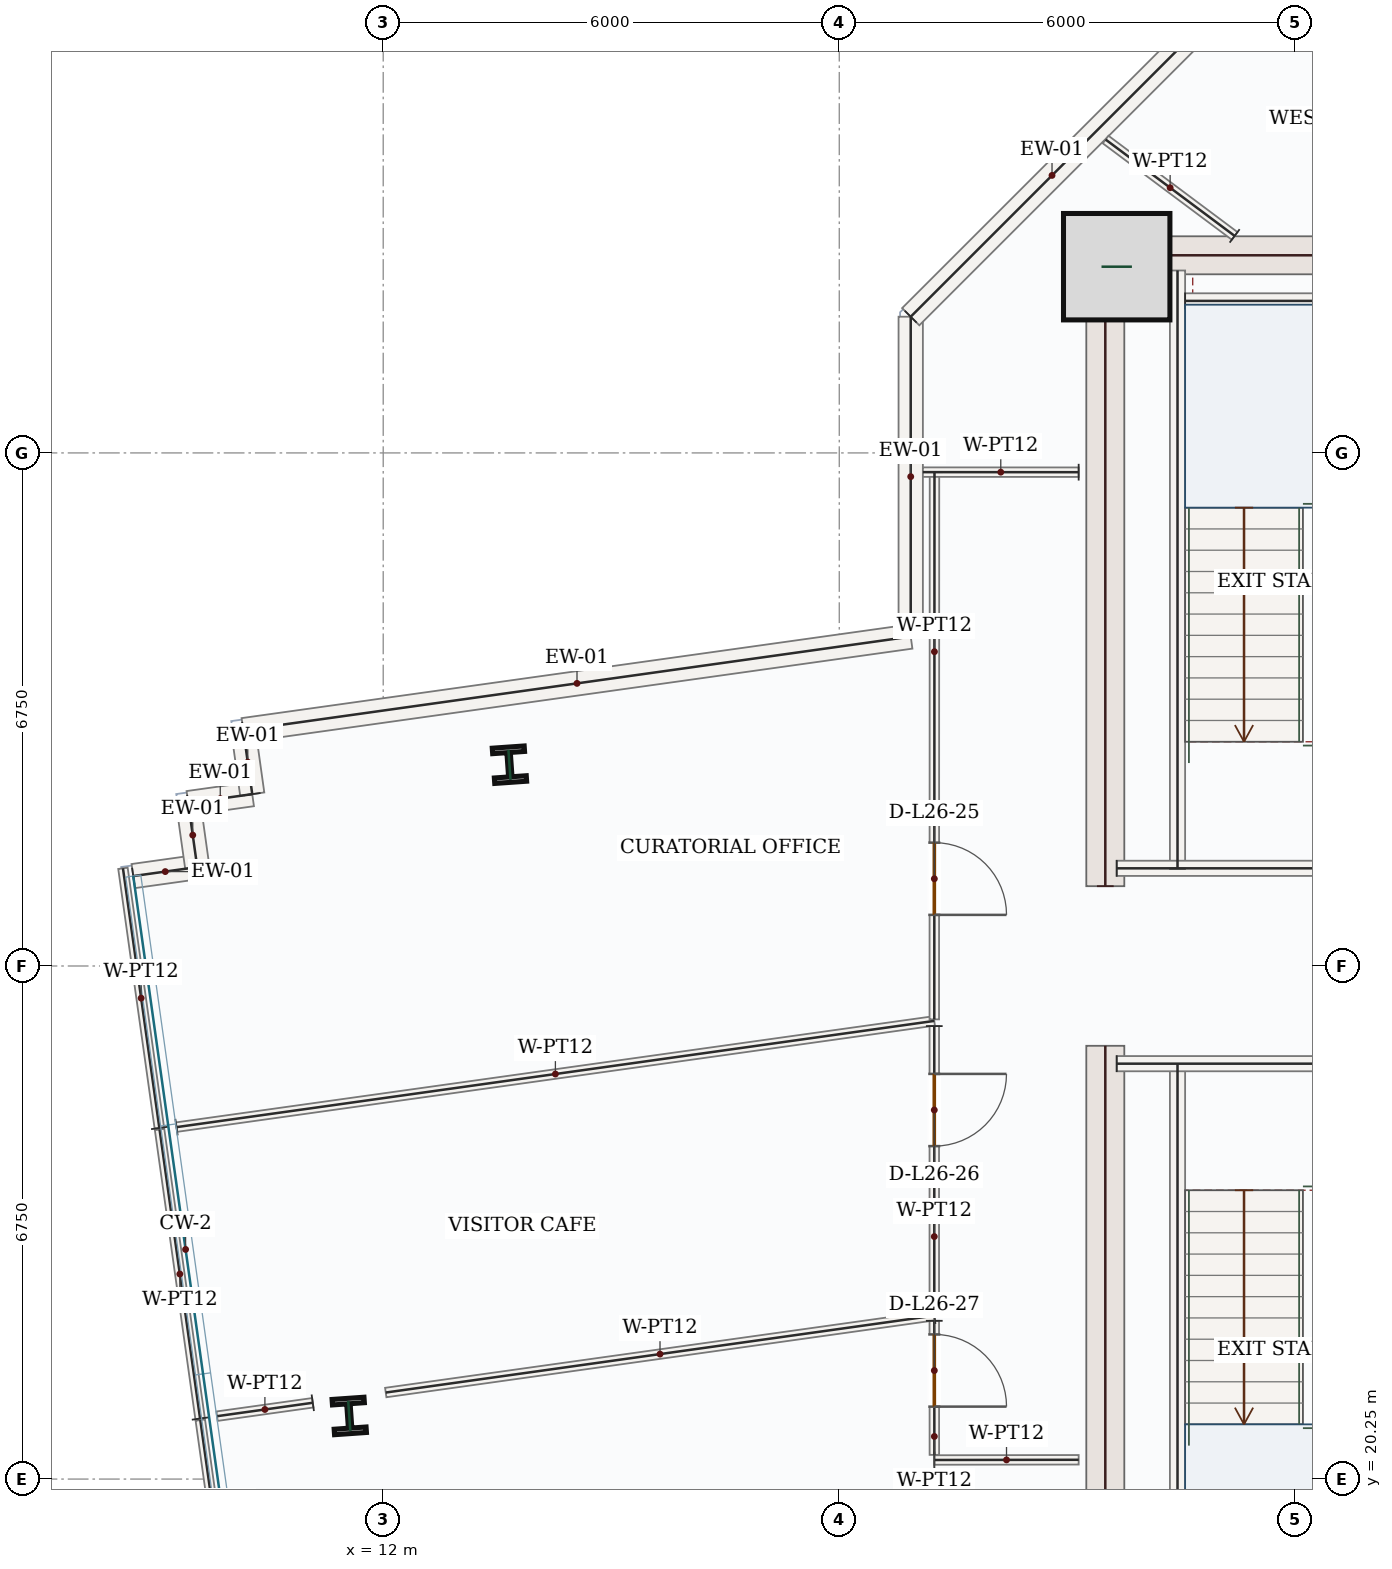
"""IFC4 building model, lengths in metres.
Left out: names, types, materials, properties, quantities, classifications, styles, units other than length and angle.
Written with IfcOpenShell. Run it as: python <this file> out.ifc"""

import sys

from ifc_helpers import new_model, si_unit, direction, frame, frame_2d, origin, origin_2d, place, context, subcontext, project, spatial, rectangle, i_section, extrude, source, transform, mapped, element, fill, save


model = new_model("IFC4")
c1 = context("Model", 3, precision=1e-05, world=origin(), true_north=direction((0.0, 1.0)))
c2 = subcontext(c1, "Body", "Model", "MODEL_VIEW")
j1 = project(units=[si_unit("LENGTHUNIT", "METRE"), si_unit("PLANEANGLEUNIT", "RADIAN")], contexts=[c1])
p1 = place(None, origin())
s1 = spatial("IfcSite", under=j1, at=p1, CompositionType="ELEMENT")
p2 = place(p1, origin())
s2 = spatial("IfcBuilding", under=s1, at=p2, CompositionType="ELEMENT")
p3 = place(p2, frame((0.0, 0.0, 117.3)))
s3 = spatial("IfcBuildingStorey", under=s2, at=p3, CompositionType="ELEMENT", Elevation=117.3)
m1 = source(origin(), c2, "Body", "SweptSolid", [
    extrude(rectangle(XDim=8.55, YDim=0.5, at=frame_2d((4.275, 0.0))), origin(), (0.0, 0.0, 1.0), 3.95),
])
for number, where, z_axis, x_axis in (
    (1, (21.5, 17.4, 0.0), (0.0, 0.0, 1.0), (0.0, 1.0, 0.0)),
    (2, (21.5, 28.05, 0.0), (0.0, 0.0, 1.0), (0.0, 1.0, 0.0)),
):
    element("IfcWall", number, at=place(p3, frame(where, z_axis=z_axis, x_axis=x_axis)), inside=s3, PredefinedType="SHEAR", context=c2, shape_type="MappedRepresentation", body=[
        mapped(m1, transform((0.0, 0.0, 0.0), x_axis=(1.0, 0.0, 0.0), y_axis=(0.0, 1.0, 0.0), z_axis=(0.0, 0.0, 1.0), scale=1.0)),
    ])
m2 = source(origin(), c2, "Body", "SweptSolid", [
    extrude(rectangle(XDim=7.0, YDim=0.5, at=frame_2d((3.5, 0.0))), origin(), (0.0, 0.0, 1.0), 3.95),
])
p4 = place(p3, frame((21.75, 36.35, 0.0), z_axis=(0.0, 0.0, 1.0), x_axis=(1.0, 0.0, 0.0)))
e3 = element("IfcWall", 3, at=p4, inside=s3, PredefinedType="SHEAR", context=c2, shape_type="MappedRepresentation", body=[
    mapped(m2, transform((0.0, 0.0, 0.0), x_axis=(1.0, 0.0, 0.0), y_axis=(0.0, 1.0, 0.0), z_axis=(0.0, 0.0, 1.0), scale=1.0)),
])
m3 = source(origin(), c2, "Body", "SweptSolid", [
    extrude(rectangle(XDim=1.4, YDim=1.4, at=origin_2d()), origin(), (0.0, 0.0, 1.0), 4.2),
])
p5 = place(p3, frame((21.65, 36.2, 0.0), z_axis=(0.0, 0.0, 1.0), x_axis=(1.0, 0.0, 0.0)))
e4 = element("IfcColumn", 4, at=p5, inside=s3, PredefinedType="COLUMN", context=c2, shape_type="MappedRepresentation", body=[
    mapped(m3, transform((0.0, 0.0, 0.0), x_axis=(1.0, 0.0, 0.0), y_axis=(0.0, 1.0, 0.0), z_axis=(0.0, 0.0, 1.0), scale=1.0)),
])
m4 = source(origin(), c2, "Body", "SweptSolid", [
    extrude(i_section(OverallWidth=0.421, OverallDepth=0.465, WebThickness=0.045, FlangeThickness=0.073, FilletRadius=0.018, at=origin_2d()), origin(), (0.0, 0.0, 1.0), 4.2),
])
for number, where, z_axis, x_axis in (
    (5, (13.661, 29.648, 0.0), (0.0, 0.0, 1.0), (0.998, 0.07, 0.0)),
    (6, (11.553, 21.08, 0.0), (0.0, 0.0, 1.0), (0.998, 0.07, 0.0)),
):
    element("IfcColumn", number, at=place(p3, frame(where, z_axis=z_axis, x_axis=x_axis)), inside=s3, PredefinedType="COLUMN", context=c2, shape_type="MappedRepresentation", body=[
        mapped(m4, transform((0.0, 0.0, 0.0), x_axis=(1.0, 0.0, 0.0), y_axis=(0.0, 1.0, 0.0), z_axis=(0.0, 0.0, 1.0), scale=1.0)),
    ])
m5 = source(origin(), c2, "Body", "SweptSolid", [
    extrude(rectangle(XDim=0.85, YDim=0.32, at=frame_2d((0.425, 0.0))), origin(), (0.0, 0.0, 1.0), 3.95),
])
for number, where, z_axis, x_axis in (
    (7, (8.711, 28.183, 0.0), (0.0, 0.0, 1.0), (0.99, 0.139, 0.0)),
    (8, (9.553, 28.301, 0.0), (0.0, 0.0, 1.0), (-0.139, 0.99, 0.0)),
    (9, (9.435, 29.143, 0.0), (0.0, 0.0, 1.0), (0.99, 0.139, 0.0)),
    (10, (10.277, 29.261, 0.0), (0.0, 0.0, 1.0), (-0.139, 0.99, 0.0)),
):
    element("IfcWall", number, at=place(p3, frame(where, z_axis=z_axis, x_axis=x_axis)), inside=s3, PredefinedType="SOLIDWALL", context=c2, shape_type="MappedRepresentation", body=[
        mapped(m5, transform((0.0, 0.0, 0.0), x_axis=(1.0, 0.0, 0.0), y_axis=(0.0, 1.0, 0.0), z_axis=(0.0, 0.0, 1.0), scale=1.0)),
    ])
m6 = source(origin(), c2, "Body", "SweptSolid", [
    extrude(rectangle(XDim=8.867, YDim=0.32, at=frame_2d((4.433, 0.0))), origin(), (0.0, 0.0, 1.0), 3.95),
])
p6 = place(p3, frame((10.159, 30.103, 0.0), z_axis=(0.0, 0.0, 1.0), x_axis=(0.990316171862, 0.138830399225, 0.0)))
e11 = element("IfcWall", 11, at=p6, inside=s3, PredefinedType="SOLIDWALL", context=c2, shape_type="MappedRepresentation", body=[
    mapped(m6, transform((0.0, 0.0, 0.0), x_axis=(1.0, 0.0, 0.0), y_axis=(0.0, 1.0, 0.0), z_axis=(0.0, 0.0, 1.0), scale=1.0)),
])
m7 = source(origin(), c2, "Body", "SweptSolid", [
    extrude(rectangle(XDim=4.208, YDim=0.32, at=frame_2d((2.104, 0.0))), origin(), (0.0, 0.0, 1.0), 3.95),
])
p7 = place(p3, frame((18.94, 31.333, 0.0), z_axis=(0.0, 0.0, 1.0), x_axis=(0.0, 1.0, 0.0)))
e12 = element("IfcWall", 12, at=p7, inside=s3, PredefinedType="SOLIDWALL", context=c2, shape_type="MappedRepresentation", body=[
    mapped(m7, transform((0.0, 0.0, 0.0), x_axis=(1.0, 0.0, 0.0), y_axis=(0.0, 1.0, 0.0), z_axis=(0.0, 0.0, 1.0), scale=1.0)),
])
m8 = source(origin(), c2, "Body", "SweptSolid", [
    extrude(rectangle(XDim=5.258, YDim=0.32, at=frame_2d((2.629, 0.0))), origin(), (0.0, 0.0, 1.0), 3.95),
])
p8 = place(p3, frame((18.94, 35.542, 0.0), z_axis=(0.0, 0.0, 1.0), x_axis=(0.707106781187, 0.707106781187, 0.0)))
e13 = element("IfcWall", 13, at=p8, inside=s3, PredefinedType="SOLIDWALL", context=c2, shape_type="MappedRepresentation", body=[
    mapped(m8, transform((0.0, 0.0, 0.0), x_axis=(1.0, 0.0, 0.0), y_axis=(0.0, 1.0, 0.0), z_axis=(0.0, 0.0, 1.0), scale=1.0)),
])
m9 = source(origin(), c2, "Body", "SweptSolid", [
    extrude(rectangle(XDim=7.87, YDim=0.2, at=frame_2d((3.935, 0.0))), origin(), (0.0, 0.0, 1.0), 3.95),
])
for number, where, z_axis, x_axis in (
    (14, (22.45, 17.85, 0.0), (0.0, 0.0, 1.0), (0.0, 1.0, 0.0)),
    (15, (22.45, 28.28, 0.0), (0.0, 0.0, 1.0), (0.0, 1.0, 0.0)),
):
    element("IfcWall", number, at=place(p3, frame(where, z_axis=z_axis, x_axis=x_axis)), inside=s3, PredefinedType="SOLIDWALL", context=c2, shape_type="MappedRepresentation", body=[
        mapped(m9, transform((0.0, 0.0, 0.0), x_axis=(1.0, 0.0, 0.0), y_axis=(0.0, 1.0, 0.0), z_axis=(0.0, 0.0, 1.0), scale=1.0)),
    ])
m10 = source(origin(), c2, "Body", "SweptSolid", [
    extrude(rectangle(XDim=4.25, YDim=0.2, at=frame_2d((2.125, 0.0))), origin(), (0.0, 0.0, 1.0), 3.95),
])
for number, where, z_axis, x_axis in (
    (16, (21.65, 25.715, 0.0), (0.0, 0.0, 1.0), (1.0, 0.0, 0.0)),
    (17, (21.65, 28.285, 0.0), (0.0, 0.0, 1.0), (1.0, 0.0, 0.0)),
):
    element("IfcWall", number, at=place(p3, frame(where, z_axis=z_axis, x_axis=x_axis)), inside=s3, PredefinedType="SOLIDWALL", context=c2, shape_type="MappedRepresentation", body=[
        mapped(m10, transform((0.0, 0.0, 0.0), x_axis=(1.0, 0.0, 0.0), y_axis=(0.0, 1.0, 0.0), z_axis=(0.0, 0.0, 1.0), scale=1.0)),
    ])
m11 = source(origin(), c2, "Body", "SweptSolid", [
    extrude(rectangle(XDim=3.25, YDim=0.2, at=frame_2d((1.625, 0.0))), origin(), (0.0, 0.0, 1.0), 3.95),
])
p9 = place(p3, frame((22.55, 35.75, 0.0), z_axis=(0.0, 0.0, 1.0), x_axis=(1.0, 0.0, 0.0)))
e18 = element("IfcWall", 18, at=p9, inside=s3, PredefinedType="SOLIDWALL", context=c2, shape_type="MappedRepresentation", body=[
    mapped(m11, transform((0.0, 0.0, 0.0), x_axis=(1.0, 0.0, 0.0), y_axis=(0.0, 1.0, 0.0), z_axis=(0.0, 0.0, 1.0), scale=1.0)),
])
m12 = source(origin(), c2, "Body", "SweptSolid", [
    extrude(rectangle(XDim=1.272, YDim=0.125, at=frame_2d((0.636, 0.0))), origin(), (0.0, 0.0, 1.0), 3.95),
])
p10 = place(p3, frame((11.073, 21.254, 0.0), z_axis=(0.0, 0.0, 1.0), x_axis=(-0.990325928558, -0.138760784176, 0.0)))
e19 = element("IfcWall", 19, at=p10, inside=s3, PredefinedType="PARTITIONING", context=c2, shape_type="MappedRepresentation", body=[
    mapped(m12, transform((0.0, 0.0, 0.0), x_axis=(1.0, 0.0, 0.0), y_axis=(0.0, 1.0, 0.0), z_axis=(0.0, 0.0, 1.0), scale=1.0)),
])
m13 = source(origin(), c2, "Body", "SweptSolid", [
    extrude(rectangle(XDim=3.84, YDim=0.125, at=frame_2d((1.92, 0.0))), origin(), (0.0, 0.0, 1.0), 3.95),
])
p11 = place(p3, frame((9.591, 21.046, 0.0), z_axis=(0.0, 0.0, 1.0), x_axis=(-0.138795007241, 0.990321132747, 0.0)))
e20 = element("IfcWall", 20, at=p11, inside=s3, PredefinedType="PARTITIONING", context=c2, shape_type="MappedRepresentation", body=[
    mapped(m13, transform((0.0, 0.0, 0.0), x_axis=(1.0, 0.0, 0.0), y_axis=(0.0, 1.0, 0.0), z_axis=(0.0, 0.0, 1.0), scale=1.0)),
])
m14 = source(origin(), c2, "Body", "SweptSolid", [
    extrude(rectangle(XDim=10.067, YDim=0.125, at=frame_2d((5.033, 0.0))), origin(), (0.0, 0.0, 1.0), 3.95),
])
p12 = place(p3, frame((9.281, 24.88, 0.0), z_axis=(0.0, 0.0, 1.0), x_axis=(0.990318089486, 0.138816719584, 0.0)))
e21 = element("IfcWall", 21, at=p12, inside=s3, PredefinedType="PARTITIONING", context=c2, shape_type="MappedRepresentation", body=[
    mapped(m14, transform((0.0, 0.0, 0.0), x_axis=(1.0, 0.0, 0.0), y_axis=(0.0, 1.0, 0.0), z_axis=(0.0, 0.0, 1.0), scale=1.0)),
])
p13 = place(p3, frame((19.25, 26.209, 0.0), z_axis=(0.0, 0.0, 1.0), x_axis=(0.0, -1.0, 0.0)))
e22 = element("IfcWall", 22, at=p13, inside=s3, PredefinedType="PARTITIONING", context=c2, shape_type="SweptSolid", body=[
    extrude(rectangle(XDim=3.809, YDim=0.125, at=frame_2d((1.905, 0.0))), origin(), (0.0, 0.0, 1.0), 3.95),
])
p14 = place(p13, frame((0.629, 0.0, 0.0)))
e23 = element("IfcOpeningElement", 23, at=p14, cuts=e22, PredefinedType="OPENING", context=c2, shape_type="SweptSolid", body=[
    extrude(rectangle(XDim=0.95, YDim=2.15, at=frame_2d((0.475, 1.075))), frame((0.0, 0.073, 0.0), z_axis=(0.0, -1.0, 0.0), x_axis=(1.0, 0.0, 0.0)), (0.0, 0.0, 1.0), 0.145),
])
m15 = source(origin(), c2, "Body", "SweptSolid", [
    extrude(rectangle(XDim=7.287, YDim=0.125, at=frame_2d((3.644, 0.0))), origin(), (0.0, 0.0, 1.0), 3.95),
])
p15 = place(p3, frame((19.25, 22.4, 0.0), z_axis=(0.0, 0.0, 1.0), x_axis=(-0.990314677425, -0.138841059045, 0.0)))
e24 = element("IfcWall", 24, at=p15, inside=s3, PredefinedType="PARTITIONING", context=c2, shape_type="MappedRepresentation", body=[
    mapped(m15, transform((0.0, 0.0, 0.0), x_axis=(1.0, 0.0, 0.0), y_axis=(0.0, 1.0, 0.0), z_axis=(0.0, 0.0, 1.0), scale=1.0)),
])
m16 = source(origin(), c2, "Body", "SweptSolid", [
    extrude(rectangle(XDim=2.119, YDim=0.125, at=frame_2d((1.059, 0.0))), origin(), (0.0, 0.0, 1.0), 3.95),
])
p16 = place(p3, frame((23.202, 36.605, 0.0), z_axis=(0.0, 0.0, 1.0), x_axis=(-0.801201403988, 0.598394777925, 0.0)))
e25 = element("IfcWall", 25, at=p16, inside=s3, PredefinedType="PARTITIONING", context=c2, shape_type="MappedRepresentation", body=[
    mapped(m16, transform((0.0, 0.0, 0.0), x_axis=(1.0, 0.0, 0.0), y_axis=(0.0, 1.0, 0.0), z_axis=(0.0, 0.0, 1.0), scale=1.0)),
])
p17 = place(p3, frame((19.253, 33.497, 0.0), z_axis=(0.0, 0.0, 1.0), x_axis=(-0.000373020422, -0.999999930428, 0.0)))
e26 = element("IfcWall", 26, at=p17, inside=s3, PredefinedType="PARTITIONING", context=c2, shape_type="SweptSolid", body=[
    extrude(rectangle(XDim=7.199, YDim=0.125, at=frame_2d((3.6, 0.0))), origin(), (0.0, 0.0, 1.0), 3.95),
])
p18 = place(p17, frame((4.875, 0.0, 0.0)))
e27 = element("IfcOpeningElement", 27, at=p18, cuts=e26, PredefinedType="OPENING", context=c2, shape_type="SweptSolid", body=[
    extrude(rectangle(XDim=0.95, YDim=2.15, at=frame_2d((0.475, 1.075))), frame((0.0, 0.073, 0.0), z_axis=(0.0, -1.0, 0.0), x_axis=(1.0, 0.0, 0.0)), (0.0, 0.0, 1.0), 0.145),
])
m17 = source(origin(), c2, "Body", "SweptSolid", [
    extrude(rectangle(XDim=3.45, YDim=0.125, at=frame_2d((1.725, 0.0))), origin(), (0.0, 0.0, 1.0), 3.95),
])
p19 = place(p3, frame((9.055, 24.869, 0.0), z_axis=(0.0, 0.0, 1.0), x_axis=(-0.13883522696, 0.990315495059, 0.0)))
e28 = element("IfcWall", 28, at=p19, inside=s3, PredefinedType="PARTITIONING", context=c2, shape_type="MappedRepresentation", body=[
    mapped(m17, transform((0.0, 0.0, 0.0), x_axis=(1.0, 0.0, 0.0), y_axis=(0.0, 1.0, 0.0), z_axis=(0.0, 0.0, 1.0), scale=1.0)),
])
m18 = source(origin(), c2, "Body", "SweptSolid", [
    extrude(rectangle(XDim=2.049, YDim=0.125, at=frame_2d((1.025, 0.0))), origin(), (0.0, 0.0, 1.0), 3.95),
])
p20 = place(p3, frame((21.149, 33.497, 0.0), z_axis=(0.0, 0.0, 1.0), x_axis=(-0.999999936133, 0.000357398119, 0.0)))
e29 = element("IfcWall", 29, at=p20, inside=s3, PredefinedType="PARTITIONING", context=c2, shape_type="MappedRepresentation", body=[
    mapped(m18, transform((0.0, 0.0, 0.0), x_axis=(1.0, 0.0, 0.0), y_axis=(0.0, 1.0, 0.0), z_axis=(0.0, 0.0, 1.0), scale=1.0)),
])
m19 = source(origin(), c2, "Body", "SweptSolid", [
    extrude(rectangle(XDim=1.898, YDim=0.125, at=frame_2d((0.949, 0.0))), origin(), (0.0, 0.0, 1.0), 3.95),
])
p21 = place(p3, frame((19.251, 20.501, 0.0), z_axis=(0.0, 0.0, 1.0), x_axis=(0.999998999442, 0.001414607638, 0.0)))
e30 = element("IfcWall", 30, at=p21, inside=s3, PredefinedType="PARTITIONING", context=c2, shape_type="MappedRepresentation", body=[
    mapped(m19, transform((0.0, 0.0, 0.0), x_axis=(1.0, 0.0, 0.0), y_axis=(0.0, 1.0, 0.0), z_axis=(0.0, 0.0, 1.0), scale=1.0)),
])
m20 = source(origin(), c2, "Body", "SweptSolid", [
    extrude(rectangle(XDim=2.83, YDim=0.125, at=frame_2d((1.415, 0.0))), origin(), (0.0, 0.0, 1.0), 3.95),
])
p22 = place(p3, frame((9.987, 18.224, 0.0), z_axis=(0.0, 0.0, 1.0), x_axis=(-0.138811993372, 0.990318751966, 0.0)))
e31 = element("IfcWall", 31, at=p22, inside=s3, PredefinedType="PARTITIONING", context=c2, shape_type="MappedRepresentation", body=[
    mapped(m20, transform((0.0, 0.0, 0.0), x_axis=(1.0, 0.0, 0.0), y_axis=(0.0, 1.0, 0.0), z_axis=(0.0, 0.0, 1.0), scale=1.0)),
])
p23 = place(p3, frame((19.25, 22.332, 0.0), z_axis=(0.0, 0.0, 1.0), x_axis=(0.00055378643, -0.99999984666, 0.0)))
e32 = element("IfcWall", 32, at=p23, inside=s3, PredefinedType="PARTITIONING", context=c2, shape_type="SweptSolid", body=[
    extrude(rectangle(XDim=1.763, YDim=0.125, at=frame_2d((0.882, 0.0))), origin(), (0.0, 0.0, 1.0), 3.95),
])
p24 = place(p23, frame((0.179, 0.0, 0.0)))
e33 = element("IfcOpeningElement", 33, at=p24, cuts=e32, PredefinedType="OPENING", context=c2, shape_type="SweptSolid", body=[
    extrude(rectangle(XDim=0.95, YDim=2.15, at=frame_2d((0.475, 1.075))), frame((0.0, 0.073, 0.0), z_axis=(0.0, -1.0, 0.0), x_axis=(1.0, 0.0, 0.0)), (0.0, 0.0, 1.0), 0.145),
])
m21 = source(origin(), c2, "Body", "SweptSolid", [
    extrude(rectangle(XDim=0.95, YDim=2.15, at=frame_2d((0.475, 1.075))), frame((0.0, 0.025, 0.0), z_axis=(0.0, -1.0, 0.0), x_axis=(1.0, 0.0, 0.0)), (0.0, 0.0, 1.0), 0.05),
])
p25 = place(p18, origin())
e34 = element("IfcDoor", 34, at=p25, inside=s3, OperationType="SINGLE_SWING_RIGHT", PredefinedType="DOOR", context=c2, shape_type="MappedRepresentation", body=[
    mapped(m21, transform((0.0, 0.0, 0.0), x_axis=(1.0, 0.0, 0.0), y_axis=(0.0, 1.0, 0.0), z_axis=(0.0, 0.0, 1.0), scale=1.0)),
])
fill(e27, e34)
p26 = place(p14, origin())
e35 = element("IfcDoor", 35, at=p26, inside=s3, OperationType="SINGLE_SWING_LEFT", PredefinedType="DOOR", context=c2, shape_type="MappedRepresentation", body=[
    mapped(m21, transform((0.0, 0.0, 0.0), x_axis=(1.0, 0.0, 0.0), y_axis=(0.0, 1.0, 0.0), z_axis=(0.0, 0.0, 1.0), scale=1.0)),
])
fill(e23, e35)
p27 = place(p24, origin())
e36 = element("IfcDoor", 36, at=p27, inside=s3, OperationType="SINGLE_SWING_RIGHT", PredefinedType="DOOR", context=c2, shape_type="MappedRepresentation", body=[
    mapped(m21, transform((0.0, 0.0, 0.0), x_axis=(1.0, 0.0, 0.0), y_axis=(0.0, 1.0, 0.0), z_axis=(0.0, 0.0, 1.0), scale=1.0)),
])
fill(e33, e36)
save(model, sys.argv[1])
